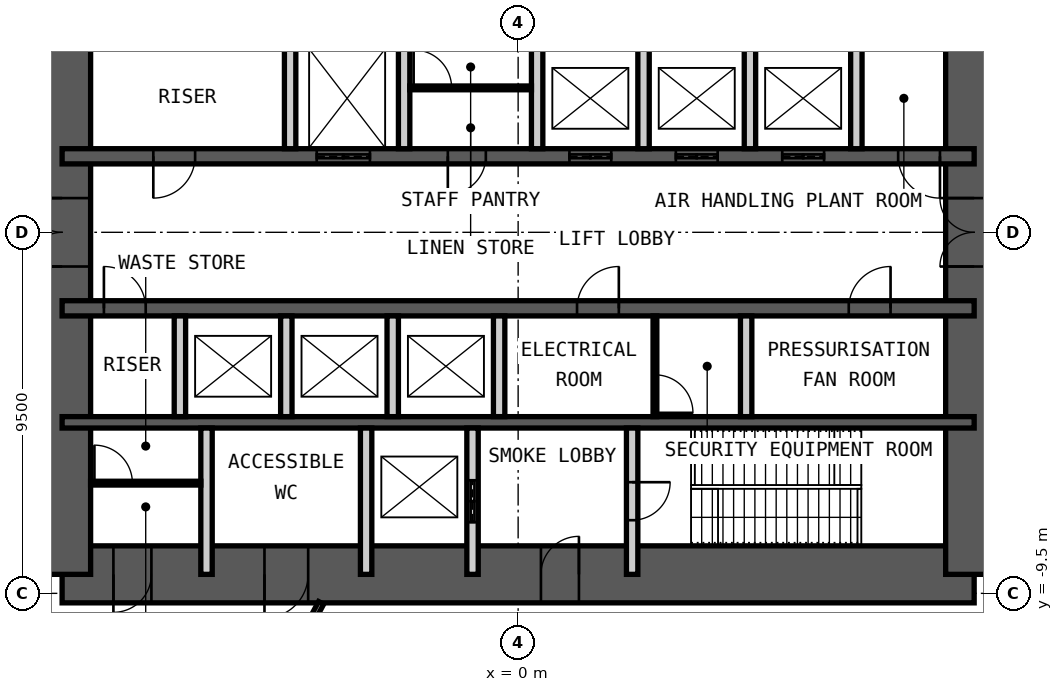
"""IFC4 building model, lengths in metres.
Left out: names, types, materials, properties, quantities, classifications, styles, units other than length and angle.
Written with IfcOpenShell. Run it as: python <this file> out.ifc"""

import sys

from ifc_helpers import new_model, si_unit, direction, frame, frame_2d, origin, place, context, subcontext, project, spatial, rectangle, extrude, element, fill, save


model = new_model("IFC4")
c1 = context("Model", 3, precision=1e-05, world=origin(), true_north=direction((0.0, 1.0)))
c2 = subcontext(c1, "Body", "Model", "MODEL_VIEW")
j1 = project(units=[si_unit("LENGTHUNIT", "METRE"), si_unit("PLANEANGLEUNIT", "RADIAN")], contexts=[c1])
p1 = place(None, origin())
s1 = spatial("IfcSite", under=j1, at=p1, CompositionType="ELEMENT")
p2 = place(p1, origin())
s2 = spatial("IfcBuilding", under=s1, at=p2, CompositionType="ELEMENT")
p3 = place(p2, frame((0.0, 0.0, 6.0)))
s3 = spatial("IfcBuildingStorey", under=s2, at=p3, CompositionType="ELEMENT", Elevation=6.0)
p4 = place(p3, frame((-12.0, -9.0, 0.0), z_axis=(0.0, 0.0, 1.0), x_axis=(1.0, 0.0, 0.0)))
e1 = element("IfcWall", 1, at=p4, inside=s3, PredefinedType="SHEAR", context=c2, shape_type="SweptSolid", body=[
    extrude(rectangle(XDim=24.0, YDim=1.5, at=frame_2d((12.0, 0.0))), origin(), (0.0, 0.0, 1.0), 6.0),
])
p5 = place(p4, frame((1.35, 0.0, 0.0)))
e2 = element("IfcOpeningElement", 2, at=p5, cuts=e1, PredefinedType="OPENING", context=c2, shape_type="SweptSolid", body=[
    extrude(rectangle(XDim=1.0, YDim=2.1, at=frame_2d((0.5, 1.05))), frame((0.0, 0.76, 0.0), z_axis=(0.0, -1.0, 0.0), x_axis=(1.0, 0.0, 0.0)), (0.0, 0.0, 1.0), 1.52),
])
p6 = place(p4, frame((5.325, 0.0, 0.0)))
e3 = element("IfcOpeningElement", 3, at=p6, cuts=e1, PredefinedType="OPENING", context=c2, shape_type="SweptSolid", body=[
    extrude(rectangle(XDim=1.15, YDim=2.1, at=frame_2d((0.575, 1.05))), frame((0.0, 0.76, 0.0), z_axis=(0.0, -1.0, 0.0), x_axis=(1.0, 0.0, 0.0)), (0.0, 0.0, 1.0), 1.52),
])
p7 = place(p4, frame((12.6, 0.0, 0.0)))
e4 = element("IfcOpeningElement", 4, at=p7, cuts=e1, PredefinedType="OPENING", context=c2, shape_type="SweptSolid", body=[
    extrude(rectangle(XDim=1.0, YDim=2.1, at=frame_2d((0.5, 1.05))), frame((0.0, 0.76, 0.0), z_axis=(0.0, -1.0, 0.0), x_axis=(1.0, 0.0, 0.0)), (0.0, 0.0, 1.0), 1.52),
])
p8 = place(p3, frame((12.0, -9.0, 0.0), z_axis=(0.0, 0.0, 1.0), x_axis=(0.0, 1.0, 0.0)))
e5 = element("IfcWall", 5, at=p8, inside=s3, PredefinedType="SHEAR", context=c2, shape_type="SweptSolid", body=[
    extrude(rectangle(XDim=18.0, YDim=1.5, at=frame_2d((9.0, 0.0))), origin(), (0.0, 0.0, 1.0), 6.0),
])
p9 = place(p8, frame((8.1, 0.0, 0.0)))
e6 = element("IfcOpeningElement", 6, at=p9, cuts=e5, PredefinedType="OPENING", context=c2, shape_type="SweptSolid", body=[
    extrude(rectangle(XDim=1.8, YDim=2.1, at=frame_2d((0.9, 1.05))), frame((0.0, 0.76, 0.0), z_axis=(0.0, -1.0, 0.0), x_axis=(1.0, 0.0, 0.0)), (0.0, 0.0, 1.0), 1.52),
])
p10 = place(p3, frame((-12.0, -9.0, 0.0), z_axis=(0.0, 0.0, 1.0), x_axis=(0.0, 1.0, 0.0)))
e7 = element("IfcWall", 7, at=p10, inside=s3, PredefinedType="SHEAR", context=c2, shape_type="SweptSolid", body=[
    extrude(rectangle(XDim=18.0, YDim=1.5, at=frame_2d((9.0, 0.0))), origin(), (0.0, 0.0, 1.0), 6.0),
])
p11 = place(p10, frame((8.1, 0.0, 0.0)))
e8 = element("IfcOpeningElement", 8, at=p11, cuts=e7, PredefinedType="OPENING", context=c2, shape_type="SweptSolid", body=[
    extrude(rectangle(XDim=1.8, YDim=2.1, at=frame_2d((0.9, 1.05))), frame((0.0, 0.76, 0.0), z_axis=(0.0, -1.0, 0.0), x_axis=(1.0, 0.0, 0.0)), (0.0, 0.0, 1.0), 1.52),
])
p12 = place(p3, frame((-12.0, 2.0, 0.0), z_axis=(0.0, 0.0, 1.0), x_axis=(1.0, 0.0, 0.0)))
e9 = element("IfcWall", 9, at=p12, inside=s3, PredefinedType="SHEAR", context=c2, shape_type="SweptSolid", body=[
    extrude(rectangle(XDim=24.0, YDim=0.4, at=frame_2d((12.0, 0.0))), origin(), (0.0, 0.0, 1.0), 6.0),
])
p13 = place(p12, frame((2.4, 0.0, 0.0)))
e10 = element("IfcOpeningElement", 10, at=p13, cuts=e9, PredefinedType="OPENING", context=c2, shape_type="SweptSolid", body=[
    extrude(rectangle(XDim=1.1, YDim=2.1, at=frame_2d((0.55, 1.05))), frame((0.0, 0.21, 0.0), z_axis=(0.0, -1.0, 0.0), x_axis=(1.0, 0.0, 0.0)), (0.0, 0.0, 1.0), 0.42),
])
p14 = place(p12, frame((22.0, 0.0, 0.0)))
e11 = element("IfcOpeningElement", 11, at=p14, cuts=e9, PredefinedType="OPENING", context=c2, shape_type="SweptSolid", body=[
    extrude(rectangle(XDim=1.1, YDim=2.1, at=frame_2d((0.55, 1.05))), frame((0.0, 0.21, 0.0), z_axis=(0.0, -1.0, 0.0), x_axis=(1.0, 0.0, 0.0)), (0.0, 0.0, 1.0), 0.42),
])
p15 = place(p12, frame((10.15, 0.0, 0.0)))
e12 = element("IfcOpeningElement", 12, at=p15, cuts=e9, PredefinedType="OPENING", context=c2, shape_type="SweptSolid", body=[
    extrude(rectangle(XDim=1.0, YDim=2.1, at=frame_2d((0.5, 1.05))), frame((0.0, 0.21, 0.0), z_axis=(0.0, -1.0, 0.0), x_axis=(1.0, 0.0, 0.0)), (0.0, 0.0, 1.0), 0.42),
])
p16 = place(p12, frame((6.7, 0.0, 0.0)))
e13 = element("IfcOpeningElement", 13, at=p16, cuts=e9, PredefinedType="OPENING", context=c2, shape_type="SweptSolid", body=[
    extrude(rectangle(XDim=1.4, YDim=2.4, at=frame_2d((0.7, 1.2))), frame((0.0, 0.21, 0.0), z_axis=(0.0, -1.0, 0.0), x_axis=(1.0, 0.0, 0.0)), (0.0, 0.0, 1.0), 0.42),
])
p17 = place(p12, frame((13.35, 0.0, 0.0)))
e14 = element("IfcOpeningElement", 14, at=p17, cuts=e9, PredefinedType="OPENING", context=c2, shape_type="SweptSolid", body=[
    extrude(rectangle(XDim=1.1, YDim=2.4, at=frame_2d((0.55, 1.2))), frame((0.0, 0.21, 0.0), z_axis=(0.0, -1.0, 0.0), x_axis=(1.0, 0.0, 0.0)), (0.0, 0.0, 1.0), 0.42),
])
p18 = place(p12, frame((16.15, 0.0, 0.0)))
e15 = element("IfcOpeningElement", 15, at=p18, cuts=e9, PredefinedType="OPENING", context=c2, shape_type="SweptSolid", body=[
    extrude(rectangle(XDim=1.1, YDim=2.4, at=frame_2d((0.55, 1.2))), frame((0.0, 0.21, 0.0), z_axis=(0.0, -1.0, 0.0), x_axis=(1.0, 0.0, 0.0)), (0.0, 0.0, 1.0), 0.42),
])
p19 = place(p12, frame((18.95, 0.0, 0.0)))
e16 = element("IfcOpeningElement", 16, at=p19, cuts=e9, PredefinedType="OPENING", context=c2, shape_type="SweptSolid", body=[
    extrude(rectangle(XDim=1.1, YDim=2.4, at=frame_2d((0.55, 1.2))), frame((0.0, 0.21, 0.0), z_axis=(0.0, -1.0, 0.0), x_axis=(1.0, 0.0, 0.0)), (0.0, 0.0, 1.0), 0.42),
])
p20 = place(p3, frame((-12.0, -2.0, 0.0), z_axis=(0.0, 0.0, 1.0), x_axis=(1.0, 0.0, 0.0)))
e17 = element("IfcWall", 17, at=p20, inside=s3, PredefinedType="SHEAR", context=c2, shape_type="SweptSolid", body=[
    extrude(rectangle(XDim=24.0, YDim=0.4, at=frame_2d((12.0, 0.0))), origin(), (0.0, 0.0, 1.0), 6.0),
])
p21 = place(p20, frame((1.1, 0.0, 0.0)))
e18 = element("IfcOpeningElement", 18, at=p21, cuts=e17, PredefinedType="OPENING", context=c2, shape_type="SweptSolid", body=[
    extrude(rectangle(XDim=1.1, YDim=2.1, at=frame_2d((0.55, 1.05))), frame((0.0, 0.21, 0.0), z_axis=(0.0, -1.0, 0.0), x_axis=(1.0, 0.0, 0.0)), (0.0, 0.0, 1.0), 0.42),
])
p22 = place(p20, frame((13.55, 0.0, 0.0)))
e19 = element("IfcOpeningElement", 19, at=p22, cuts=e17, PredefinedType="OPENING", context=c2, shape_type="SweptSolid", body=[
    extrude(rectangle(XDim=1.1, YDim=2.1, at=frame_2d((0.55, 1.05))), frame((0.0, 0.21, 0.0), z_axis=(0.0, -1.0, 0.0), x_axis=(1.0, 0.0, 0.0)), (0.0, 0.0, 1.0), 0.42),
])
p23 = place(p20, frame((20.7, 0.0, 0.0)))
e20 = element("IfcOpeningElement", 20, at=p23, cuts=e17, PredefinedType="OPENING", context=c2, shape_type="SweptSolid", body=[
    extrude(rectangle(XDim=1.1, YDim=2.1, at=frame_2d((0.55, 1.05))), frame((0.0, 0.21, 0.0), z_axis=(0.0, -1.0, 0.0), x_axis=(1.0, 0.0, 0.0)), (0.0, 0.0, 1.0), 0.42),
])
p24 = place(p3, frame((-12.0, -5.0, 0.0), z_axis=(0.0, 0.0, 1.0), x_axis=(1.0, 0.0, 0.0)))
e21 = element("IfcWall", 21, at=p24, inside=s3, PredefinedType="SHEAR", context=c2, shape_type="SweptSolid", body=[
    extrude(rectangle(XDim=24.0, YDim=0.3, at=frame_2d((12.0, 0.0))), origin(), (0.0, 0.0, 1.0), 6.0),
])
for number, where, z_axis, x_axis in (
    (22, (-6.0, 2.2, 0.0), (0.0, 0.0, 1.0), (0.0, 1.0, 0.0)),
    (23, (-3.0, 2.2, 0.0), (0.0, 0.0, 1.0), (0.0, 1.0, 0.0)),
    (24, (0.5, 2.2, 0.0), (0.0, 0.0, 1.0), (0.0, 1.0, 0.0)),
    (25, (3.3, 2.2, 0.0), (0.0, 0.0, 1.0), (0.0, 1.0, 0.0)),
    (26, (6.1, 2.2, 0.0), (0.0, 0.0, 1.0), (0.0, 1.0, 0.0)),
    (27, (8.9, 2.2, 0.0), (0.0, 0.0, 1.0), (0.0, 1.0, 0.0)),
    (28, (-8.9, -4.85, 0.0), (0.0, 0.0, 1.0), (0.0, 1.0, 0.0)),
    (29, (-6.1, -4.85, 0.0), (0.0, 0.0, 1.0), (0.0, 1.0, 0.0)),
    (30, (-3.3, -4.85, 0.0), (0.0, 0.0, 1.0), (0.0, 1.0, 0.0)),
    (31, (-0.5, -4.85, 0.0), (0.0, 0.0, 1.0), (0.0, 1.0, 0.0)),
    (32, (6.0, -4.85, 0.0), (0.0, 0.0, 1.0), (0.0, 1.0, 0.0)),
):
    element("IfcWall", number, at=place(p3, frame(where, z_axis=z_axis, x_axis=x_axis)), inside=s3, PredefinedType="PARTITIONING", context=c2, shape_type="SweptSolid", body=[
        extrude(rectangle(XDim=2.65, YDim=0.3, at=frame_2d((1.325, 0.0))), origin(), (0.0, 0.0, 1.0), 5.78),
    ])
for number, where, z_axis, x_axis in (
    (33, (-8.2, -9.0, 0.0), (0.0, 0.0, 1.0), (0.0, 1.0, 0.0)),
    (34, (-4.0, -9.0, 0.0), (0.0, 0.0, 1.0), (0.0, 1.0, 0.0)),
):
    element("IfcWall", number, at=place(p3, frame(where, z_axis=z_axis, x_axis=x_axis)), inside=s3, PredefinedType="PARTITIONING", context=c2, shape_type="SweptSolid", body=[
        extrude(rectangle(XDim=3.85, YDim=0.3, at=frame_2d((1.925, 0.0))), origin(), (0.0, 0.0, 1.0), 5.78),
    ])
p25 = place(p3, frame((-1.2, -9.0, 0.0), z_axis=(0.0, 0.0, 1.0), x_axis=(0.0, 1.0, 0.0)))
e35 = element("IfcWall", 35, at=p25, inside=s3, PredefinedType="PARTITIONING", context=c2, shape_type="SweptSolid", body=[
    extrude(rectangle(XDim=3.85, YDim=0.3, at=frame_2d((1.925, 0.0))), origin(), (0.0, 0.0, 1.0), 5.78),
])
p26 = place(p25, frame((1.375, 0.0, 0.0)))
e36 = element("IfcOpeningElement", 36, at=p26, cuts=e35, PredefinedType="OPENING", context=c2, shape_type="SweptSolid", body=[
    extrude(rectangle(XDim=1.1, YDim=2.4, at=frame_2d((0.55, 1.2))), frame((0.0, 0.16, 0.0), z_axis=(0.0, -1.0, 0.0), x_axis=(1.0, 0.0, 0.0)), (0.0, 0.0, 1.0), 0.32),
])
p27 = place(p3, frame((3.0, -9.0, 0.0), z_axis=(0.0, 0.0, 1.0), x_axis=(0.0, 1.0, 0.0)))
e37 = element("IfcWall", 37, at=p27, inside=s3, PredefinedType="PARTITIONING", context=c2, shape_type="SweptSolid", body=[
    extrude(rectangle(XDim=3.85, YDim=0.3, at=frame_2d((1.925, 0.0))), origin(), (0.0, 0.0, 1.0), 5.78),
])
p28 = place(p27, frame((1.425, 0.0, 0.0)))
e38 = element("IfcOpeningElement", 38, at=p28, cuts=e37, PredefinedType="OPENING", context=c2, shape_type="SweptSolid", body=[
    extrude(rectangle(XDim=1.0, YDim=2.1, at=frame_2d((0.5, 1.05))), frame((0.0, 0.16, 0.0), z_axis=(0.0, -1.0, 0.0), x_axis=(1.0, 0.0, 0.0)), (0.0, 0.0, 1.0), 0.32),
])
p29 = place(p3, frame((-2.85, 3.8, 0.0), z_axis=(0.0, 0.0, 1.0), x_axis=(1.0, 0.0, 0.0)))
e39 = element("IfcWall", 39, at=p29, inside=s3, PredefinedType="PARTITIONING", context=c2, shape_type="SweptSolid", body=[
    extrude(rectangle(XDim=3.2, YDim=0.1, at=frame_2d((1.6, 0.0))), origin(), (0.0, 0.0, 1.0), 5.78),
])
p30 = place(p29, frame((0.1, 0.0, 0.0)))
e40 = element("IfcOpeningElement", 40, at=p30, cuts=e39, PredefinedType="OPENING", context=c2, shape_type="SweptSolid", body=[
    extrude(rectangle(XDim=1.0, YDim=2.4, at=frame_2d((0.5, 1.2))), frame((0.0, 0.06, 0.0), z_axis=(0.0, -1.0, 0.0), x_axis=(1.0, 0.0, 0.0)), (0.0, 0.0, 1.0), 0.12),
])
p31 = place(p3, frame((3.6, -4.85, 0.0), z_axis=(0.0, 0.0, 1.0), x_axis=(0.0, 1.0, 0.0)))
e41 = element("IfcWall", 41, at=p31, inside=s3, PredefinedType="PARTITIONING", context=c2, shape_type="SweptSolid", body=[
    extrude(rectangle(XDim=2.65, YDim=0.1, at=frame_2d((1.325, 0.0))), origin(), (0.0, 0.0, 1.0), 5.78),
])
p32 = place(p31, frame((0.1, 0.0, 0.0)))
e42 = element("IfcOpeningElement", 42, at=p32, cuts=e41, PredefinedType="OPENING", context=c2, shape_type="SweptSolid", body=[
    extrude(rectangle(XDim=1.0, YDim=2.4, at=frame_2d((0.5, 1.2))), frame((0.0, 0.06, 0.0), z_axis=(0.0, -1.0, 0.0), x_axis=(1.0, 0.0, 0.0)), (0.0, 0.0, 1.0), 0.12),
])
p33 = place(p3, frame((-11.25, -6.6, 0.0), z_axis=(0.0, 0.0, 1.0), x_axis=(1.0, 0.0, 0.0)))
e43 = element("IfcWall", 43, at=p33, inside=s3, PredefinedType="PARTITIONING", context=c2, shape_type="SweptSolid", body=[
    extrude(rectangle(XDim=2.9, YDim=0.1, at=frame_2d((1.45, 0.0))), origin(), (0.0, 0.0, 1.0), 5.78),
])
p34 = place(p33, frame((0.1, 0.0, 0.0)))
e44 = element("IfcOpeningElement", 44, at=p34, cuts=e43, PredefinedType="OPENING", context=c2, shape_type="SweptSolid", body=[
    extrude(rectangle(XDim=1.0, YDim=2.4, at=frame_2d((0.5, 1.2))), frame((0.0, 0.06, 0.0), z_axis=(0.0, -1.0, 0.0), x_axis=(1.0, 0.0, 0.0)), (0.0, 0.0, 1.0), 0.12),
])
p35 = place(p3, frame((-5.184, -9.75, 0.0), z_axis=(0.0, 0.0, 1.0), x_axis=(-0.469477354847, -0.882944513141, 0.0)))
e45 = element("IfcWall", 45, at=p35, inside=s3, PredefinedType="PARTITIONING", context=c2, shape_type="SweptSolid", body=[
    extrude(rectangle(XDim=26.005, YDim=0.15, at=frame_2d((13.002, 0.0))), origin(), (0.0, 0.0, 1.0), 5.75),
])
p36 = place(p35, frame((12.103, 0.0, 0.0)))
e46 = element("IfcOpeningElement", 46, at=p36, cuts=e45, PredefinedType="OPENING", context=c2, shape_type="SweptSolid", body=[
    extrude(rectangle(XDim=1.8, YDim=2.4, at=frame_2d((0.9, 1.2))), frame((0.0, 0.085, 0.0), z_axis=(0.0, -1.0, 0.0), x_axis=(1.0, 0.0, 0.0)), (0.0, 0.0, 1.0), 0.17),
])
p37 = place(p5, origin())
e47 = element("IfcDoor", 47, at=p37, inside=s3, OperationType="SINGLE_SWING_LEFT", PredefinedType="DOOR", context=c2, shape_type="SweptSolid", body=[
    extrude(rectangle(XDim=1.0, YDim=2.1, at=frame_2d((0.5, 1.05))), frame((0.0, 0.025, 0.0), z_axis=(0.0, -1.0, 0.0), x_axis=(1.0, 0.0, 0.0)), (0.0, 0.0, 1.0), 0.05),
])
fill(e2, e47)
p38 = place(p6, origin())
e48 = element("IfcDoor", 48, at=p38, inside=s3, OperationType="SINGLE_SWING_LEFT", PredefinedType="DOOR", context=c2, shape_type="SweptSolid", body=[
    extrude(rectangle(XDim=1.15, YDim=2.1, at=frame_2d((0.575, 1.05))), frame((0.0, 0.025, 0.0), z_axis=(0.0, -1.0, 0.0), x_axis=(1.0, 0.0, 0.0)), (0.0, 0.0, 1.0), 0.05),
])
fill(e3, e48)
p39 = place(p7, origin())
e49 = element("IfcDoor", 49, at=p39, inside=s3, OperationType="SINGLE_SWING_LEFT", PredefinedType="DOOR", context=c2, shape_type="SweptSolid", body=[
    extrude(rectangle(XDim=1.0, YDim=2.1, at=frame_2d((0.5, 1.05))), frame((0.0, 0.025, 0.0), z_axis=(0.0, -1.0, 0.0), x_axis=(1.0, 0.0, 0.0)), (0.0, 0.0, 1.0), 0.05),
])
fill(e4, e49)
p40 = place(p28, origin())
e50 = element("IfcDoor", 50, at=p40, inside=s3, OperationType="SINGLE_SWING_RIGHT", PredefinedType="DOOR", context=c2, shape_type="SweptSolid", body=[
    extrude(rectangle(XDim=1.0, YDim=2.1, at=frame_2d((0.5, 1.05))), frame((0.0, 0.025, 0.0), z_axis=(0.0, -1.0, 0.0), x_axis=(1.0, 0.0, 0.0)), (0.0, 0.0, 1.0), 0.05),
])
fill(e38, e50)
p41 = place(p13, origin())
e51 = element("IfcDoor", 51, at=p41, inside=s3, OperationType="SINGLE_SWING_LEFT", PredefinedType="DOOR", context=c2, shape_type="SweptSolid", body=[
    extrude(rectangle(XDim=1.1, YDim=2.1, at=frame_2d((0.55, 1.05))), frame((0.0, 0.025, 0.0), z_axis=(0.0, -1.0, 0.0), x_axis=(1.0, 0.0, 0.0)), (0.0, 0.0, 1.0), 0.05),
])
fill(e10, e51)
p42 = place(p21, origin())
e52 = element("IfcDoor", 52, at=p42, inside=s3, OperationType="SINGLE_SWING_RIGHT", PredefinedType="DOOR", context=c2, shape_type="SweptSolid", body=[
    extrude(rectangle(XDim=1.1, YDim=2.1, at=frame_2d((0.55, 1.05))), frame((0.0, 0.025, 0.0), z_axis=(0.0, -1.0, 0.0), x_axis=(1.0, 0.0, 0.0)), (0.0, 0.0, 1.0), 0.05),
])
fill(e18, e52)
p43 = place(p14, origin())
e53 = element("IfcDoor", 53, at=p43, inside=s3, OperationType="SINGLE_SWING_RIGHT", PredefinedType="DOOR", context=c2, shape_type="SweptSolid", body=[
    extrude(rectangle(XDim=1.1, YDim=2.1, at=frame_2d((0.55, 1.05))), frame((0.0, 0.025, 0.0), z_axis=(0.0, -1.0, 0.0), x_axis=(1.0, 0.0, 0.0)), (0.0, 0.0, 1.0), 0.05),
])
fill(e11, e53)
p44 = place(p15, origin())
e54 = element("IfcDoor", 54, at=p44, inside=s3, OperationType="SINGLE_SWING_LEFT", PredefinedType="DOOR", context=c2, shape_type="SweptSolid", body=[
    extrude(rectangle(XDim=1.0, YDim=2.1, at=frame_2d((0.5, 1.05))), frame((0.0, 0.025, 0.0), z_axis=(0.0, -1.0, 0.0), x_axis=(1.0, 0.0, 0.0)), (0.0, 0.0, 1.0), 0.05),
])
fill(e12, e54)
p45 = place(p22, origin())
e55 = element("IfcDoor", 55, at=p45, inside=s3, OperationType="SINGLE_SWING_LEFT", PredefinedType="DOOR", context=c2, shape_type="SweptSolid", body=[
    extrude(rectangle(XDim=1.1, YDim=2.1, at=frame_2d((0.55, 1.05))), frame((0.0, 0.025, 0.0), z_axis=(0.0, -1.0, 0.0), x_axis=(1.0, 0.0, 0.0)), (0.0, 0.0, 1.0), 0.05),
])
fill(e19, e55)
p46 = place(p23, origin())
e56 = element("IfcDoor", 56, at=p46, inside=s3, OperationType="SINGLE_SWING_LEFT", PredefinedType="DOOR", context=c2, shape_type="SweptSolid", body=[
    extrude(rectangle(XDim=1.1, YDim=2.1, at=frame_2d((0.55, 1.05))), frame((0.0, 0.025, 0.0), z_axis=(0.0, -1.0, 0.0), x_axis=(1.0, 0.0, 0.0)), (0.0, 0.0, 1.0), 0.05),
])
fill(e20, e56)
p47 = place(p9, origin())
e57 = element("IfcDoor", 57, at=p47, inside=s3, OperationType="DOUBLE_DOOR_DOUBLE_SWING", PredefinedType="DOOR", context=c2, shape_type="SweptSolid", body=[
    extrude(rectangle(XDim=1.8, YDim=2.1, at=frame_2d((0.9, 1.05))), frame((0.0, 0.025, 0.0), z_axis=(0.0, -1.0, 0.0), x_axis=(1.0, 0.0, 0.0)), (0.0, 0.0, 1.0), 0.05),
])
fill(e6, e57)
p48 = place(p11, origin())
e58 = element("IfcDoor", 58, at=p48, inside=s3, OperationType="DOUBLE_DOOR_DOUBLE_SWING", PredefinedType="DOOR", context=c2, shape_type="SweptSolid", body=[
    extrude(rectangle(XDim=1.8, YDim=2.1, at=frame_2d((0.9, 1.05))), frame((0.0, 0.025, 0.0), z_axis=(0.0, -1.0, 0.0), x_axis=(1.0, 0.0, 0.0)), (0.0, 0.0, 1.0), 0.05),
])
fill(e8, e58)
p49 = place(p26, origin())
e59 = element("IfcDoor", 59, at=p49, inside=s3, OperationType="DOUBLE_DOOR_SLIDING", PredefinedType="DOOR", context=c2, shape_type="SweptSolid", body=[
    extrude(rectangle(XDim=1.1, YDim=2.4, at=frame_2d((0.55, 1.2))), frame((0.0, 0.025, 0.0), z_axis=(0.0, -1.0, 0.0), x_axis=(1.0, 0.0, 0.0)), (0.0, 0.0, 1.0), 0.05),
])
fill(e36, e59)
p50 = place(p16, origin())
e60 = element("IfcDoor", 60, at=p50, inside=s3, OperationType="DOUBLE_DOOR_SLIDING", PredefinedType="DOOR", context=c2, shape_type="SweptSolid", body=[
    extrude(rectangle(XDim=1.4, YDim=2.4, at=frame_2d((0.7, 1.2))), frame((0.0, 0.025, 0.0), z_axis=(0.0, -1.0, 0.0), x_axis=(1.0, 0.0, 0.0)), (0.0, 0.0, 1.0), 0.05),
])
fill(e13, e60)
p51 = place(p17, origin())
e61 = element("IfcDoor", 61, at=p51, inside=s3, OperationType="DOUBLE_DOOR_SLIDING", PredefinedType="DOOR", context=c2, shape_type="SweptSolid", body=[
    extrude(rectangle(XDim=1.1, YDim=2.4, at=frame_2d((0.55, 1.2))), frame((0.0, 0.025, 0.0), z_axis=(0.0, -1.0, 0.0), x_axis=(1.0, 0.0, 0.0)), (0.0, 0.0, 1.0), 0.05),
])
fill(e14, e61)
p52 = place(p18, origin())
e62 = element("IfcDoor", 62, at=p52, inside=s3, OperationType="DOUBLE_DOOR_SLIDING", PredefinedType="DOOR", context=c2, shape_type="SweptSolid", body=[
    extrude(rectangle(XDim=1.1, YDim=2.4, at=frame_2d((0.55, 1.2))), frame((0.0, 0.025, 0.0), z_axis=(0.0, -1.0, 0.0), x_axis=(1.0, 0.0, 0.0)), (0.0, 0.0, 1.0), 0.05),
])
fill(e15, e62)
p53 = place(p19, origin())
e63 = element("IfcDoor", 63, at=p53, inside=s3, OperationType="DOUBLE_DOOR_SLIDING", PredefinedType="DOOR", context=c2, shape_type="SweptSolid", body=[
    extrude(rectangle(XDim=1.1, YDim=2.4, at=frame_2d((0.55, 1.2))), frame((0.0, 0.025, 0.0), z_axis=(0.0, -1.0, 0.0), x_axis=(1.0, 0.0, 0.0)), (0.0, 0.0, 1.0), 0.05),
])
fill(e16, e63)
p54 = place(p30, origin())
e64 = element("IfcDoor", 64, at=p54, inside=s3, OperationType="SINGLE_SWING_RIGHT", PredefinedType="DOOR", context=c2, shape_type="SweptSolid", body=[
    extrude(rectangle(XDim=1.0, YDim=2.4, at=frame_2d((0.5, 1.2))), frame((0.0, 0.025, 0.0), z_axis=(0.0, -1.0, 0.0), x_axis=(1.0, 0.0, 0.0)), (0.0, 0.0, 1.0), 0.05),
])
fill(e40, e64)
p55 = place(p32, origin())
e65 = element("IfcDoor", 65, at=p55, inside=s3, OperationType="SINGLE_SWING_LEFT", PredefinedType="DOOR", context=c2, shape_type="SweptSolid", body=[
    extrude(rectangle(XDim=1.0, YDim=2.4, at=frame_2d((0.5, 1.2))), frame((0.0, 0.025, 0.0), z_axis=(0.0, -1.0, 0.0), x_axis=(1.0, 0.0, 0.0)), (0.0, 0.0, 1.0), 0.05),
])
fill(e42, e65)
p56 = place(p34, origin())
e66 = element("IfcDoor", 66, at=p56, inside=s3, OperationType="SINGLE_SWING_RIGHT", PredefinedType="DOOR", context=c2, shape_type="SweptSolid", body=[
    extrude(rectangle(XDim=1.0, YDim=2.4, at=frame_2d((0.5, 1.2))), frame((0.0, 0.025, 0.0), z_axis=(0.0, -1.0, 0.0), x_axis=(1.0, 0.0, 0.0)), (0.0, 0.0, 1.0), 0.05),
])
fill(e44, e66)
save(model, sys.argv[1])
